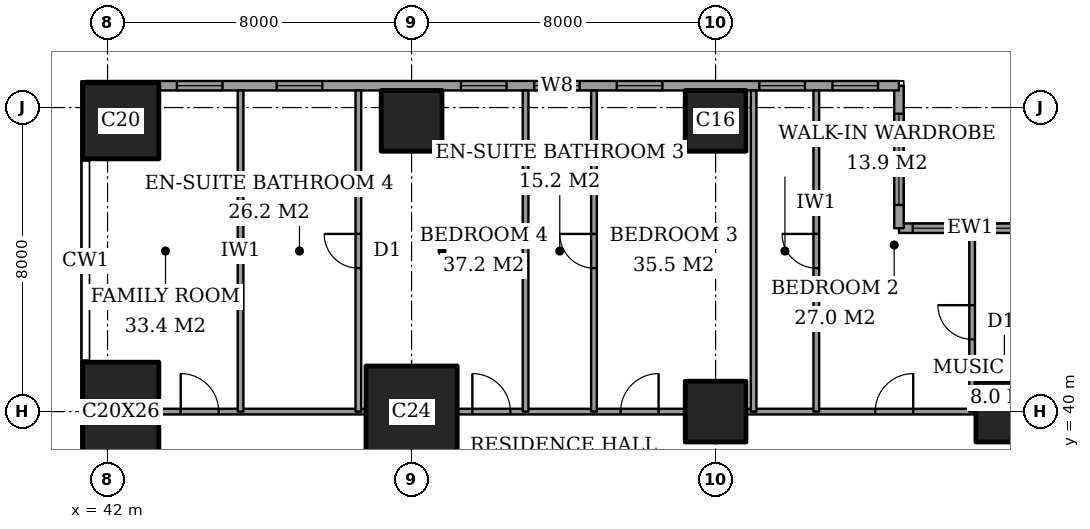
"""IFC4 building model, lengths in metres.
Left out: names, types, materials, properties, quantities, classifications, styles, units other than length and angle.
Written with IfcOpenShell. Run it as: python <this file> out.ifc"""

import sys

from ifc_helpers import new_model, si_unit, direction, frame, frame_2d, origin, origin_2d, place, context, subcontext, project, spatial, rectangle, extrude, element, fill, save


model = new_model("IFC4")
c1 = context("Model", 3, precision=1e-05, world=origin(), true_north=direction((0.0, 1.0)))
c2 = subcontext(c1, "Body", "Model", "MODEL_VIEW")
j1 = project(units=[si_unit("LENGTHUNIT", "METRE"), si_unit("PLANEANGLEUNIT", "RADIAN")], contexts=[c1])
p1 = place(None, origin())
s1 = spatial("IfcSite", under=j1, at=p1, CompositionType="ELEMENT")
p2 = place(p1, origin())
s2 = spatial("IfcBuilding", under=s1, at=p2, CompositionType="ELEMENT")
p3 = place(p2, frame((0.0, 0.0, 230.4)))
s3 = spatial("IfcBuildingStorey", under=s2, at=p3, CompositionType="ELEMENT", Elevation=230.4)
p4 = place(p3, frame((42.35, 40.0, 0.0), z_axis=(0.0, 0.0, 1.0), x_axis=(1.0, 0.0, 0.0)))
e1 = element("IfcColumn", 1, at=p4, inside=s3, PredefinedType="COLUMN", context=c2, shape_type="SweptSolid", body=[
    extrude(rectangle(XDim=2.0, YDim=2.6, at=origin_2d()), origin(), (0.0, 0.0, 1.0), 3.6),
])
p5 = place(p3, frame((42.35, 47.65, 0.0), z_axis=(0.0, 0.0, 1.0), x_axis=(1.0, 0.0, 0.0)))
e2 = element("IfcColumn", 2, at=p5, inside=s3, PredefinedType="COLUMN", context=c2, shape_type="SweptSolid", body=[
    extrude(rectangle(XDim=2.0, YDim=2.0, at=origin_2d()), origin(), (0.0, 0.0, 1.0), 3.6),
])
p6 = place(p3, frame((50.0, 40.0, 0.0), z_axis=(0.0, 0.0, 1.0), x_axis=(1.0, 0.0, 0.0)))
e3 = element("IfcColumn", 3, at=p6, inside=s3, PredefinedType="COLUMN", context=c2, shape_type="SweptSolid", body=[
    extrude(rectangle(XDim=2.4, YDim=2.4, at=origin_2d()), origin(), (0.0, 0.0, 1.0), 3.6),
])
for number, where, z_axis, x_axis in (
    (4, (50.0, 47.65, 0.0), (0.0, 0.0, 1.0), (1.0, 0.0, 0.0)),
    (5, (58.0, 40.0, 0.0), (0.0, 0.0, 1.0), (1.0, 0.0, 0.0)),
    (6, (58.0, 47.65, 0.0), (0.0, 0.0, 1.0), (1.0, 0.0, 0.0)),
    (7, (65.65, 40.0, 0.0), (0.0, 0.0, 1.0), (1.0, 0.0, 0.0)),
):
    element("IfcColumn", number, at=place(p3, frame(where, z_axis=z_axis, x_axis=x_axis)), inside=s3, PredefinedType="COLUMN", context=c2, shape_type="SweptSolid", body=[
        extrude(rectangle(XDim=1.6, YDim=1.6, at=origin_2d()), origin(), (0.0, 0.0, 1.0), 3.6),
    ])
p7 = place(p3, frame((66.575, 44.825, 0.0), z_axis=(0.0, 0.0, 1.0), x_axis=(-1.0, 0.0, 0.0)))
e8 = element("IfcWall", 8, at=p7, inside=s3, PredefinedType="SOLIDWALL", context=c2, shape_type="SweptSolid", body=[
    extrude(rectangle(XDim=3.75, YDim=0.25, at=frame_2d((1.875, 0.0))), origin(), (0.0, 0.0, 1.0), 3.6),
])
p8 = place(p7, frame((0.45, 0.0, 0.6)))
e9 = element("IfcOpeningElement", 9, at=p8, cuts=e8, PredefinedType="OPENING", context=c2, shape_type="SweptSolid", body=[
    extrude(rectangle(XDim=1.2, YDim=2.0, at=frame_2d((0.6, 1.0))), frame((0.0, 0.135, 0.0), z_axis=(0.0, -1.0, 0.0), x_axis=(1.0, 0.0, 0.0)), (0.0, 0.0, 1.0), 0.27),
])
p9 = place(p7, frame((2.188, 0.0, 0.6)))
e10 = element("IfcOpeningElement", 10, at=p9, cuts=e8, PredefinedType="OPENING", context=c2, shape_type="SweptSolid", body=[
    extrude(rectangle(XDim=1.2, YDim=2.0, at=frame_2d((0.6, 1.0))), frame((0.0, 0.135, 0.0), z_axis=(0.0, -1.0, 0.0), x_axis=(1.0, 0.0, 0.0)), (0.0, 0.0, 1.0), 0.27),
])
p10 = place(p3, frame((62.825, 44.825, 0.0), z_axis=(0.0, 0.0, 1.0), x_axis=(0.0, 1.0, 0.0)))
e11 = element("IfcWall", 11, at=p10, inside=s3, PredefinedType="SOLIDWALL", context=c2, shape_type="SweptSolid", body=[
    extrude(rectangle(XDim=3.75, YDim=0.25, at=frame_2d((1.875, 0.0))), origin(), (0.0, 0.0, 1.0), 3.6),
])
p11 = place(p10, frame((0.613, 0.0, 0.6)))
e12 = element("IfcOpeningElement", 12, at=p11, cuts=e11, PredefinedType="OPENING", context=c2, shape_type="SweptSolid", body=[
    extrude(rectangle(XDim=2.4, YDim=2.0, at=frame_2d((1.2, 1.0))), frame((0.0, 0.135, 0.0), z_axis=(0.0, -1.0, 0.0), x_axis=(1.0, 0.0, 0.0)), (0.0, 0.0, 1.0), 0.27),
])
p12 = place(p3, frame((62.825, 48.575, 0.0), z_axis=(0.0, 0.0, 1.0), x_axis=(-1.0, 0.0, 0.0)))
e13 = element("IfcWall", 13, at=p12, inside=s3, PredefinedType="SOLIDWALL", context=c2, shape_type="SweptSolid", body=[
    extrude(rectangle(XDim=21.4, YDim=0.25, at=frame_2d((10.7, 0.0))), origin(), (0.0, 0.0, 1.0), 3.6),
])
p13 = place(p12, frame((0.55, 0.0, 0.6)))
e14 = element("IfcOpeningElement", 14, at=p13, cuts=e13, PredefinedType="OPENING", context=c2, shape_type="SweptSolid", body=[
    extrude(rectangle(XDim=1.2, YDim=2.0, at=frame_2d((0.6, 1.0))), frame((0.0, 0.135, 0.0), z_axis=(0.0, -1.0, 0.0), x_axis=(1.0, 0.0, 0.0)), (0.0, 0.0, 1.0), 0.27),
])
p14 = place(p12, frame((2.475, 0.0, 0.6)))
e15 = element("IfcOpeningElement", 15, at=p14, cuts=e13, PredefinedType="OPENING", context=c2, shape_type="SweptSolid", body=[
    extrude(rectangle(XDim=1.2, YDim=2.0, at=frame_2d((0.6, 1.0))), frame((0.0, 0.135, 0.0), z_axis=(0.0, -1.0, 0.0), x_axis=(1.0, 0.0, 0.0)), (0.0, 0.0, 1.0), 0.27),
])
p15 = place(p12, frame((6.225, 0.0, 0.6)))
e16 = element("IfcOpeningElement", 16, at=p15, cuts=e13, PredefinedType="OPENING", context=c2, shape_type="SweptSolid", body=[
    extrude(rectangle(XDim=1.2, YDim=2.0, at=frame_2d((0.6, 1.0))), frame((0.0, 0.135, 0.0), z_axis=(0.0, -1.0, 0.0), x_axis=(1.0, 0.0, 0.0)), (0.0, 0.0, 1.0), 0.27),
])
p16 = place(p12, frame((8.4, 0.0, 0.6)))
e17 = element("IfcOpeningElement", 17, at=p16, cuts=e13, PredefinedType="OPENING", context=c2, shape_type="SweptSolid", body=[
    extrude(rectangle(XDim=1.2, YDim=2.0, at=frame_2d((0.6, 1.0))), frame((0.0, 0.135, 0.0), z_axis=(0.0, -1.0, 0.0), x_axis=(1.0, 0.0, 0.0)), (0.0, 0.0, 1.0), 0.27),
])
p17 = place(p12, frame((10.325, 0.0, 0.6)))
e18 = element("IfcOpeningElement", 18, at=p17, cuts=e13, PredefinedType="OPENING", context=c2, shape_type="SweptSolid", body=[
    extrude(rectangle(XDim=1.2, YDim=2.0, at=frame_2d((0.6, 1.0))), frame((0.0, 0.135, 0.0), z_axis=(0.0, -1.0, 0.0), x_axis=(1.0, 0.0, 0.0)), (0.0, 0.0, 1.0), 0.27),
])
p18 = place(p12, frame((15.175, 0.0, 0.6)))
e19 = element("IfcOpeningElement", 19, at=p18, cuts=e13, PredefinedType="OPENING", context=c2, shape_type="SweptSolid", body=[
    extrude(rectangle(XDim=1.2, YDim=2.0, at=frame_2d((0.6, 1.0))), frame((0.0, 0.135, 0.0), z_axis=(0.0, -1.0, 0.0), x_axis=(1.0, 0.0, 0.0)), (0.0, 0.0, 1.0), 0.27),
])
p19 = place(p12, frame((17.8, 0.0, 0.6)))
e20 = element("IfcOpeningElement", 20, at=p19, cuts=e13, PredefinedType="OPENING", context=c2, shape_type="SweptSolid", body=[
    extrude(rectangle(XDim=1.2, YDim=2.0, at=frame_2d((0.6, 1.0))), frame((0.0, 0.135, 0.0), z_axis=(0.0, -1.0, 0.0), x_axis=(1.0, 0.0, 0.0)), (0.0, 0.0, 1.0), 0.27),
])
p20 = place(p3, frame((43.35, 40.0, 0.0), z_axis=(0.0, 0.0, 1.0), x_axis=(1.0, 0.0, 0.0)))
e21 = element("IfcWall", 21, at=p20, inside=s3, PredefinedType="PARTITIONING", context=c2, shape_type="SweptSolid", body=[
    extrude(rectangle(XDim=5.45, YDim=0.15, at=frame_2d((2.725, 0.0))), origin(), (0.0, 0.0, 1.0), 3.35),
])
p21 = place(p20, frame((0.575, 0.0, 0.0)))
e22 = element("IfcOpeningElement", 22, at=p21, cuts=e21, PredefinedType="OPENING", context=c2, shape_type="SweptSolid", body=[
    extrude(rectangle(XDim=1.0, YDim=2.1, at=frame_2d((0.5, 1.05))), frame((0.0, 0.085, 0.0), z_axis=(0.0, -1.0, 0.0), x_axis=(1.0, 0.0, 0.0)), (0.0, 0.0, 1.0), 0.17),
])
p22 = place(p3, frame((51.2, 40.0, 0.0), z_axis=(0.0, 0.0, 1.0), x_axis=(1.0, 0.0, 0.0)))
e23 = element("IfcWall", 23, at=p22, inside=s3, PredefinedType="PARTITIONING", context=c2, shape_type="SweptSolid", body=[
    extrude(rectangle(XDim=6.0, YDim=0.15, at=frame_2d((3.0, 0.0))), origin(), (0.0, 0.0, 1.0), 3.35),
])
p23 = place(p22, frame((4.3, 0.0, 0.0)))
e24 = element("IfcOpeningElement", 24, at=p23, cuts=e23, PredefinedType="OPENING", context=c2, shape_type="SweptSolid", body=[
    extrude(rectangle(XDim=1.0, YDim=2.1, at=frame_2d((0.5, 1.05))), frame((0.0, 0.085, 0.0), z_axis=(0.0, -1.0, 0.0), x_axis=(1.0, 0.0, 0.0)), (0.0, 0.0, 1.0), 0.17),
])
p24 = place(p22, frame((0.4, 0.0, 0.0)))
e25 = element("IfcOpeningElement", 25, at=p24, cuts=e23, PredefinedType="OPENING", context=c2, shape_type="SweptSolid", body=[
    extrude(rectangle(XDim=1.0, YDim=2.1, at=frame_2d((0.5, 1.05))), frame((0.0, 0.085, 0.0), z_axis=(0.0, -1.0, 0.0), x_axis=(1.0, 0.0, 0.0)), (0.0, 0.0, 1.0), 0.17),
])
p25 = place(p3, frame((58.8, 40.0, 0.0), z_axis=(0.0, 0.0, 1.0), x_axis=(1.0, 0.0, 0.0)))
e26 = element("IfcWall", 26, at=p25, inside=s3, PredefinedType="PARTITIONING", context=c2, shape_type="SweptSolid", body=[
    extrude(rectangle(XDim=6.05, YDim=0.15, at=frame_2d((3.025, 0.0))), origin(), (0.0, 0.0, 1.0), 3.35),
])
p26 = place(p25, frame((3.4, 0.0, 0.0)))
e27 = element("IfcOpeningElement", 27, at=p26, cuts=e26, PredefinedType="OPENING", context=c2, shape_type="SweptSolid", body=[
    extrude(rectangle(XDim=1.0, YDim=2.1, at=frame_2d((0.5, 1.05))), frame((0.0, 0.085, 0.0), z_axis=(0.0, -1.0, 0.0), x_axis=(1.0, 0.0, 0.0)), (0.0, 0.0, 1.0), 0.17),
])
p27 = place(p3, frame((45.5, 40.0, 0.0), z_axis=(0.0, 0.0, 1.0), x_axis=(0.0, 1.0, 0.0)))
e28 = element("IfcWall", 28, at=p27, inside=s3, PredefinedType="PARTITIONING", context=c2, shape_type="SweptSolid", body=[
    extrude(rectangle(XDim=8.45, YDim=0.15, at=frame_2d((4.225, 0.0))), origin(), (0.0, 0.0, 1.0), 3.35),
])
p28 = place(p3, frame((48.6, 40.0, 0.0), z_axis=(0.0, 0.0, 1.0), x_axis=(0.0, 1.0, 0.0)))
e29 = element("IfcWall", 29, at=p28, inside=s3, PredefinedType="PARTITIONING", context=c2, shape_type="SweptSolid", body=[
    extrude(rectangle(XDim=8.45, YDim=0.15, at=frame_2d((4.225, 0.0))), origin(), (0.0, 0.0, 1.0), 3.35),
])
p29 = place(p28, frame((3.775, 0.0, 0.0)))
e30 = element("IfcOpeningElement", 30, at=p29, cuts=e29, PredefinedType="OPENING", context=c2, shape_type="SweptSolid", body=[
    extrude(rectangle(XDim=0.9, YDim=2.1, at=frame_2d((0.45, 1.05))), frame((0.0, 0.085, 0.0), z_axis=(0.0, -1.0, 0.0), x_axis=(1.0, 0.0, 0.0)), (0.0, 0.0, 1.0), 0.17),
])
p30 = place(p3, frame((53.0, 40.0, 0.0), z_axis=(0.0, 0.0, 1.0), x_axis=(0.0, 1.0, 0.0)))
e31 = element("IfcWall", 31, at=p30, inside=s3, PredefinedType="PARTITIONING", context=c2, shape_type="SweptSolid", body=[
    extrude(rectangle(XDim=8.45, YDim=0.15, at=frame_2d((4.225, 0.0))), origin(), (0.0, 0.0, 1.0), 3.35),
])
p31 = place(p3, frame((54.8, 40.0, 0.0), z_axis=(0.0, 0.0, 1.0), x_axis=(0.0, 1.0, 0.0)))
e32 = element("IfcWall", 32, at=p31, inside=s3, PredefinedType="PARTITIONING", context=c2, shape_type="SweptSolid", body=[
    extrude(rectangle(XDim=8.45, YDim=0.15, at=frame_2d((4.225, 0.0))), origin(), (0.0, 0.0, 1.0), 3.35),
])
p32 = place(p31, frame((3.775, 0.0, 0.0)))
e33 = element("IfcOpeningElement", 33, at=p32, cuts=e32, PredefinedType="OPENING", context=c2, shape_type="SweptSolid", body=[
    extrude(rectangle(XDim=0.9, YDim=2.1, at=frame_2d((0.45, 1.05))), frame((0.0, 0.085, 0.0), z_axis=(0.0, -1.0, 0.0), x_axis=(1.0, 0.0, 0.0)), (0.0, 0.0, 1.0), 0.17),
])
p33 = place(p3, frame((59.0, 40.0, 0.0), z_axis=(0.0, 0.0, 1.0), x_axis=(0.0, 1.0, 0.0)))
e34 = element("IfcWall", 34, at=p33, inside=s3, PredefinedType="PARTITIONING", context=c2, shape_type="SweptSolid", body=[
    extrude(rectangle(XDim=8.45, YDim=0.15, at=frame_2d((4.225, 0.0))), origin(), (0.0, 0.0, 1.0), 3.35),
])
p34 = place(p3, frame((60.65, 40.0, 0.0), z_axis=(0.0, 0.0, 1.0), x_axis=(0.0, 1.0, 0.0)))
e35 = element("IfcWall", 35, at=p34, inside=s3, PredefinedType="PARTITIONING", context=c2, shape_type="SweptSolid", body=[
    extrude(rectangle(XDim=8.45, YDim=0.15, at=frame_2d((4.225, 0.0))), origin(), (0.0, 0.0, 1.0), 3.35),
])
p35 = place(p34, frame((3.775, 0.0, 0.0)))
e36 = element("IfcOpeningElement", 36, at=p35, cuts=e35, PredefinedType="OPENING", context=c2, shape_type="SweptSolid", body=[
    extrude(rectangle(XDim=0.9, YDim=2.1, at=frame_2d((0.45, 1.05))), frame((0.0, 0.085, 0.0), z_axis=(0.0, -1.0, 0.0), x_axis=(1.0, 0.0, 0.0)), (0.0, 0.0, 1.0), 0.17),
])
p36 = place(p3, frame((64.75, 40.0, 0.0), z_axis=(0.0, 0.0, 1.0), x_axis=(0.0, 1.0, 0.0)))
e37 = element("IfcWall", 37, at=p36, inside=s3, PredefinedType="PARTITIONING", context=c2, shape_type="SweptSolid", body=[
    extrude(rectangle(XDim=4.7, YDim=0.15, at=frame_2d((2.35, 0.0))), origin(), (0.0, 0.0, 1.0), 3.35),
])
p37 = place(p36, frame((1.9, 0.0, 0.0)))
e38 = element("IfcOpeningElement", 38, at=p37, cuts=e37, PredefinedType="OPENING", context=c2, shape_type="SweptSolid", body=[
    extrude(rectangle(XDim=0.9, YDim=2.1, at=frame_2d((0.45, 1.05))), frame((0.0, 0.085, 0.0), z_axis=(0.0, -1.0, 0.0), x_axis=(1.0, 0.0, 0.0)), (0.0, 0.0, 1.0), 0.17),
])
p38 = place(p8, origin())
e39 = element("IfcWindow", 39, at=p38, inside=s3, PartitioningType="SINGLE_PANEL", PredefinedType="WINDOW", context=c2, shape_type="SweptSolid", body=[
    extrude(rectangle(XDim=1.2, YDim=2.0, at=frame_2d((0.6, 1.0))), frame((0.0, 0.03, 0.0), z_axis=(0.0, -1.0, 0.0), x_axis=(1.0, 0.0, 0.0)), (0.0, 0.0, 1.0), 0.06),
])
fill(e9, e39)
p39 = place(p9, origin())
e40 = element("IfcWindow", 40, at=p39, inside=s3, PartitioningType="SINGLE_PANEL", PredefinedType="WINDOW", context=c2, shape_type="SweptSolid", body=[
    extrude(rectangle(XDim=1.2, YDim=2.0, at=frame_2d((0.6, 1.0))), frame((0.0, 0.03, 0.0), z_axis=(0.0, -1.0, 0.0), x_axis=(1.0, 0.0, 0.0)), (0.0, 0.0, 1.0), 0.06),
])
fill(e10, e40)
p40 = place(p11, origin())
e41 = element("IfcWindow", 41, at=p40, inside=s3, PartitioningType="SINGLE_PANEL", PredefinedType="WINDOW", context=c2, shape_type="SweptSolid", body=[
    extrude(rectangle(XDim=2.4, YDim=2.0, at=frame_2d((1.2, 1.0))), frame((0.0, 0.03, 0.0), z_axis=(0.0, -1.0, 0.0), x_axis=(1.0, 0.0, 0.0)), (0.0, 0.0, 1.0), 0.06),
])
fill(e12, e41)
p41 = place(p13, origin())
e42 = element("IfcWindow", 42, at=p41, inside=s3, PartitioningType="SINGLE_PANEL", PredefinedType="WINDOW", context=c2, shape_type="SweptSolid", body=[
    extrude(rectangle(XDim=1.2, YDim=2.0, at=frame_2d((0.6, 1.0))), frame((0.0, 0.03, 0.0), z_axis=(0.0, -1.0, 0.0), x_axis=(1.0, 0.0, 0.0)), (0.0, 0.0, 1.0), 0.06),
])
fill(e14, e42)
p42 = place(p14, origin())
e43 = element("IfcWindow", 43, at=p42, inside=s3, PartitioningType="SINGLE_PANEL", PredefinedType="WINDOW", context=c2, shape_type="SweptSolid", body=[
    extrude(rectangle(XDim=1.2, YDim=2.0, at=frame_2d((0.6, 1.0))), frame((0.0, 0.03, 0.0), z_axis=(0.0, -1.0, 0.0), x_axis=(1.0, 0.0, 0.0)), (0.0, 0.0, 1.0), 0.06),
])
fill(e15, e43)
p43 = place(p15, origin())
e44 = element("IfcWindow", 44, at=p43, inside=s3, PartitioningType="SINGLE_PANEL", PredefinedType="WINDOW", context=c2, shape_type="SweptSolid", body=[
    extrude(rectangle(XDim=1.2, YDim=2.0, at=frame_2d((0.6, 1.0))), frame((0.0, 0.03, 0.0), z_axis=(0.0, -1.0, 0.0), x_axis=(1.0, 0.0, 0.0)), (0.0, 0.0, 1.0), 0.06),
])
fill(e16, e44)
p44 = place(p16, origin())
e45 = element("IfcWindow", 45, at=p44, inside=s3, PartitioningType="SINGLE_PANEL", PredefinedType="WINDOW", context=c2, shape_type="SweptSolid", body=[
    extrude(rectangle(XDim=1.2, YDim=2.0, at=frame_2d((0.6, 1.0))), frame((0.0, 0.03, 0.0), z_axis=(0.0, -1.0, 0.0), x_axis=(1.0, 0.0, 0.0)), (0.0, 0.0, 1.0), 0.06),
])
fill(e17, e45)
p45 = place(p17, origin())
e46 = element("IfcWindow", 46, at=p45, inside=s3, PartitioningType="SINGLE_PANEL", PredefinedType="WINDOW", context=c2, shape_type="SweptSolid", body=[
    extrude(rectangle(XDim=1.2, YDim=2.0, at=frame_2d((0.6, 1.0))), frame((0.0, 0.03, 0.0), z_axis=(0.0, -1.0, 0.0), x_axis=(1.0, 0.0, 0.0)), (0.0, 0.0, 1.0), 0.06),
])
fill(e18, e46)
p46 = place(p18, origin())
e47 = element("IfcWindow", 47, at=p46, inside=s3, PartitioningType="SINGLE_PANEL", PredefinedType="WINDOW", context=c2, shape_type="SweptSolid", body=[
    extrude(rectangle(XDim=1.2, YDim=2.0, at=frame_2d((0.6, 1.0))), frame((0.0, 0.03, 0.0), z_axis=(0.0, -1.0, 0.0), x_axis=(1.0, 0.0, 0.0)), (0.0, 0.0, 1.0), 0.06),
])
fill(e19, e47)
p47 = place(p19, origin())
e48 = element("IfcWindow", 48, at=p47, inside=s3, PartitioningType="SINGLE_PANEL", PredefinedType="WINDOW", context=c2, shape_type="SweptSolid", body=[
    extrude(rectangle(XDim=1.2, YDim=2.0, at=frame_2d((0.6, 1.0))), frame((0.0, 0.03, 0.0), z_axis=(0.0, -1.0, 0.0), x_axis=(1.0, 0.0, 0.0)), (0.0, 0.0, 1.0), 0.06),
])
fill(e20, e48)
p48 = place(p37, origin())
e49 = element("IfcDoor", 49, at=p48, inside=s3, OperationType="SINGLE_SWING_LEFT", PredefinedType="DOOR", context=c2, shape_type="SweptSolid", body=[
    extrude(rectangle(XDim=0.9, YDim=2.1, at=frame_2d((0.45, 1.05))), frame((0.0, 0.025, 0.0), z_axis=(0.0, -1.0, 0.0), x_axis=(1.0, 0.0, 0.0)), (0.0, 0.0, 1.0), 0.05),
])
fill(e38, e49)
p49 = place(p26, origin())
e50 = element("IfcDoor", 50, at=p49, inside=s3, OperationType="SINGLE_SWING_LEFT", PredefinedType="DOOR", context=c2, shape_type="SweptSolid", body=[
    extrude(rectangle(XDim=1.0, YDim=2.1, at=frame_2d((0.5, 1.05))), frame((0.0, 0.025, 0.0), z_axis=(0.0, -1.0, 0.0), x_axis=(1.0, 0.0, 0.0)), (0.0, 0.0, 1.0), 0.05),
])
fill(e27, e50)
p50 = place(p35, origin())
e51 = element("IfcDoor", 51, at=p50, inside=s3, OperationType="SINGLE_SWING_LEFT", PredefinedType="DOOR", context=c2, shape_type="SweptSolid", body=[
    extrude(rectangle(XDim=0.9, YDim=2.1, at=frame_2d((0.45, 1.05))), frame((0.0, 0.025, 0.0), z_axis=(0.0, -1.0, 0.0), x_axis=(1.0, 0.0, 0.0)), (0.0, 0.0, 1.0), 0.05),
])
fill(e36, e51)
p51 = place(p23, origin())
e52 = element("IfcDoor", 52, at=p51, inside=s3, OperationType="SINGLE_SWING_LEFT", PredefinedType="DOOR", context=c2, shape_type="SweptSolid", body=[
    extrude(rectangle(XDim=1.0, YDim=2.1, at=frame_2d((0.5, 1.05))), frame((0.0, 0.025, 0.0), z_axis=(0.0, -1.0, 0.0), x_axis=(1.0, 0.0, 0.0)), (0.0, 0.0, 1.0), 0.05),
])
fill(e24, e52)
p52 = place(p32, origin())
e53 = element("IfcDoor", 53, at=p52, inside=s3, OperationType="SINGLE_SWING_LEFT", PredefinedType="DOOR", context=c2, shape_type="SweptSolid", body=[
    extrude(rectangle(XDim=0.9, YDim=2.1, at=frame_2d((0.45, 1.05))), frame((0.0, 0.025, 0.0), z_axis=(0.0, -1.0, 0.0), x_axis=(1.0, 0.0, 0.0)), (0.0, 0.0, 1.0), 0.05),
])
fill(e33, e53)
p53 = place(p24, origin())
e54 = element("IfcDoor", 54, at=p53, inside=s3, OperationType="SINGLE_SWING_RIGHT", PredefinedType="DOOR", context=c2, shape_type="SweptSolid", body=[
    extrude(rectangle(XDim=1.0, YDim=2.1, at=frame_2d((0.5, 1.05))), frame((0.0, 0.025, 0.0), z_axis=(0.0, -1.0, 0.0), x_axis=(1.0, 0.0, 0.0)), (0.0, 0.0, 1.0), 0.05),
])
fill(e25, e54)
p54 = place(p29, origin())
e55 = element("IfcDoor", 55, at=p54, inside=s3, OperationType="SINGLE_SWING_LEFT", PredefinedType="DOOR", context=c2, shape_type="SweptSolid", body=[
    extrude(rectangle(XDim=0.9, YDim=2.1, at=frame_2d((0.45, 1.05))), frame((0.0, 0.025, 0.0), z_axis=(0.0, -1.0, 0.0), x_axis=(1.0, 0.0, 0.0)), (0.0, 0.0, 1.0), 0.05),
])
fill(e30, e55)
p55 = place(p21, origin())
e56 = element("IfcDoor", 56, at=p55, inside=s3, OperationType="SINGLE_SWING_RIGHT", PredefinedType="DOOR", context=c2, shape_type="SweptSolid", body=[
    extrude(rectangle(XDim=1.0, YDim=2.1, at=frame_2d((0.5, 1.05))), frame((0.0, 0.025, 0.0), z_axis=(0.0, -1.0, 0.0), x_axis=(1.0, 0.0, 0.0)), (0.0, 0.0, 1.0), 0.05),
])
fill(e22, e56)
save(model, sys.argv[1])
